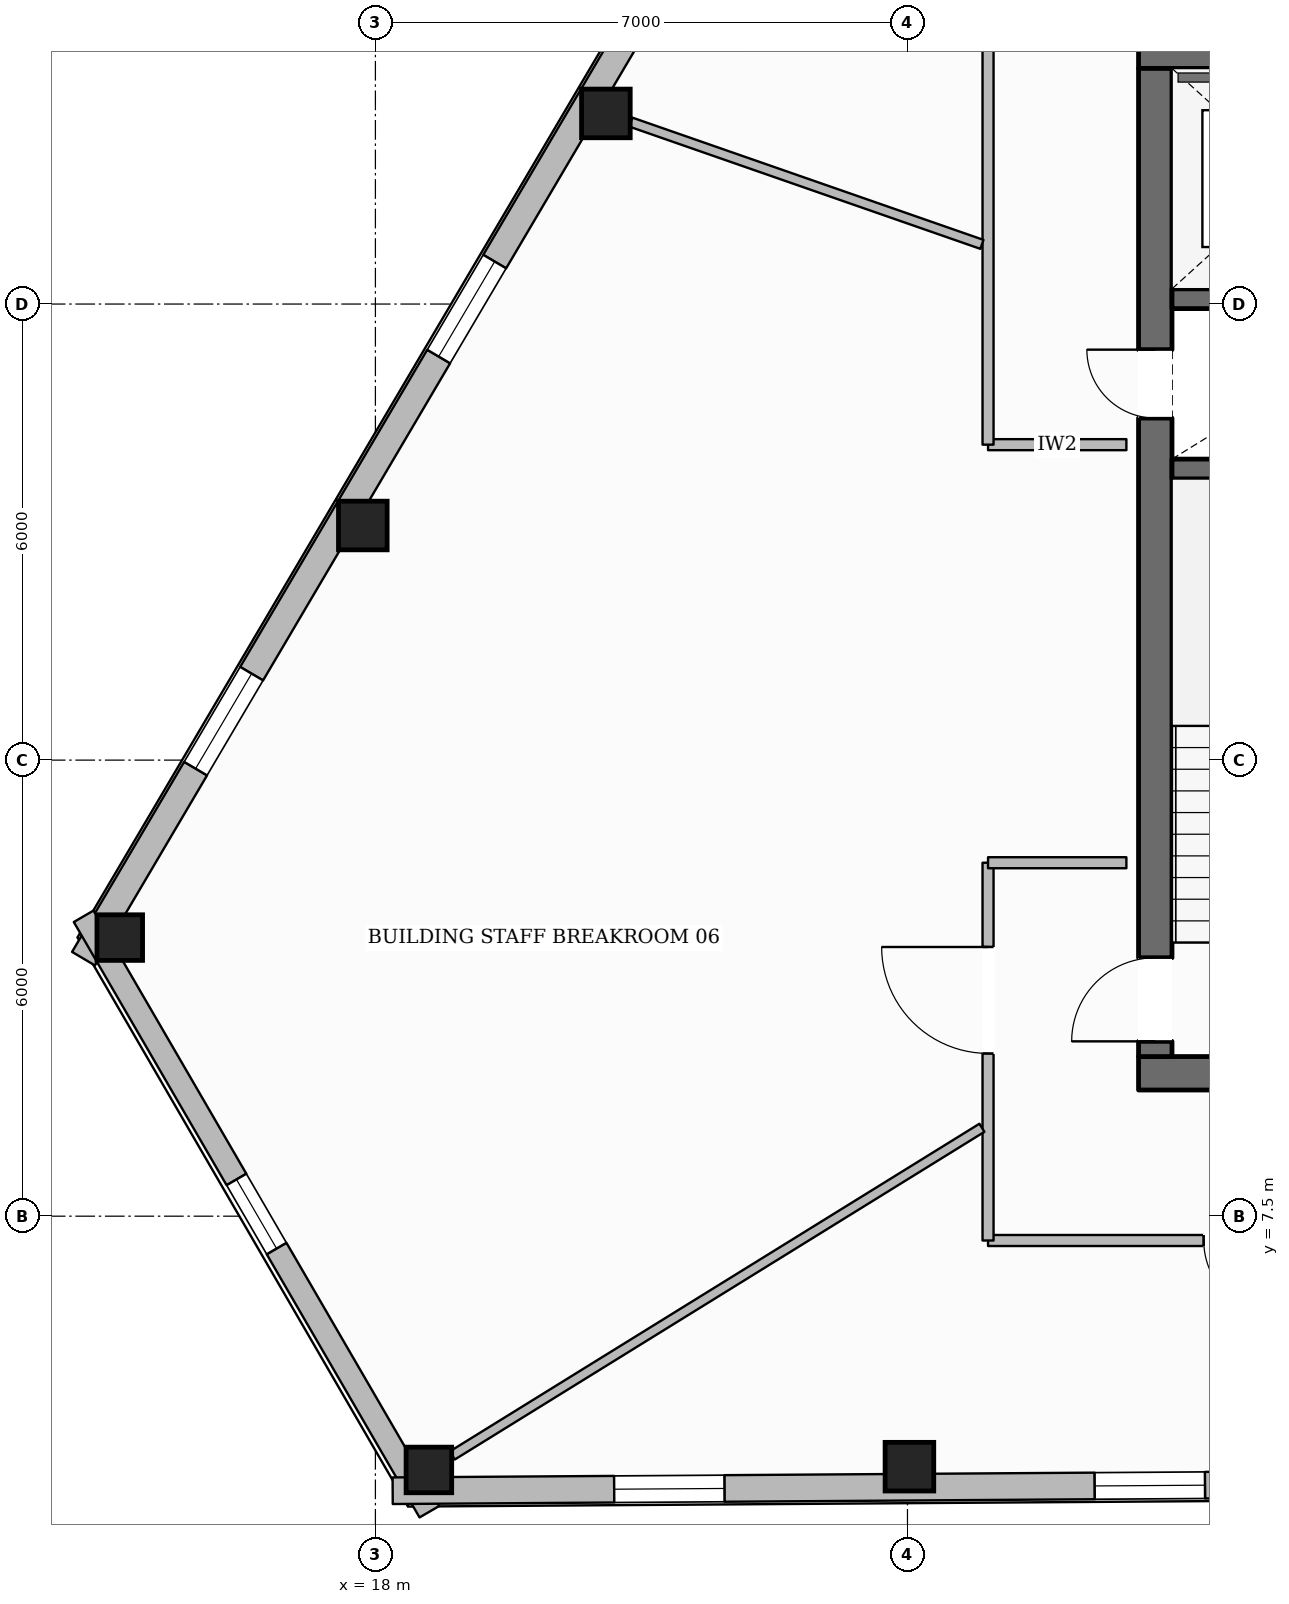
"""IFC4 building model, lengths in metres.
Left out: names, types, materials, properties, quantities, classifications, styles, units other than length and angle.
Written with IfcOpenShell. Run it as: python <this file> out.ifc"""

import sys

from ifc_helpers import new_model, si_unit, direction, frame, frame_2d, origin, origin_2d, place, context, subcontext, project, spatial, rectangle, hollow_rectangle, extrude, element, fill, save


model = new_model("IFC4")
c1 = context("Model", 3, precision=1e-05, world=origin(), true_north=direction((0.0, 1.0)))
c2 = subcontext(c1, "Body", "Model", "MODEL_VIEW")
j1 = project(units=[si_unit("LENGTHUNIT", "METRE"), si_unit("PLANEANGLEUNIT", "RADIAN")], contexts=[c1])
p1 = place(None, origin())
s1 = spatial("IfcSite", under=j1, at=p1, CompositionType="ELEMENT")
p2 = place(p1, origin())
s2 = spatial("IfcBuilding", under=s1, at=p2, CompositionType="ELEMENT")
p3 = place(p2, frame((0.0, 0.0, 211.2)))
s3 = spatial("IfcBuildingStorey", under=s2, at=p3, CompositionType="ELEMENT", Elevation=211.2)
p4 = place(p3, frame((28.04, 9.38, 0.0), z_axis=(0.0, 0.0, 1.0), x_axis=(1.0, 0.0, 0.0)))
e1 = element("IfcWall", 1, at=p4, inside=s3, PredefinedType="SOLIDWALL", context=c2, shape_type="SweptSolid", body=[
    extrude(rectangle(XDim=19.92, YDim=0.44, at=frame_2d((9.96, 0.0))), origin(), (0.0, 0.0, 1.0), 3.6),
])
p5 = place(p4, frame((10.46, 0.0, 0.0)))
e2 = element("IfcOpeningElement", 2, at=p5, cuts=e1, PredefinedType="OPENING", context=c2, shape_type="SweptSolid", body=[
    extrude(rectangle(XDim=1.4, YDim=2.2, at=frame_2d((0.7, 1.1))), frame((0.0, 0.23, 0.0), z_axis=(0.0, -1.0, 0.0), x_axis=(1.0, 0.0, 0.0)), (0.0, 0.0, 1.0), 0.46),
])
p6 = place(p3, frame((28.04, 22.82, 0.0), z_axis=(0.0, 0.0, 1.0), x_axis=(1.0, 0.0, 0.0)))
e3 = element("IfcWall", 3, at=p6, inside=s3, PredefinedType="SOLIDWALL", context=c2, shape_type="SweptSolid", body=[
    extrude(rectangle(XDim=19.92, YDim=0.44, at=frame_2d((9.96, 0.0))), origin(), (0.0, 0.0, 1.0), 3.6),
])
p7 = place(p6, frame((6.235, 0.0, 0.0)))
e4 = element("IfcOpeningElement", 4, at=p7, cuts=e3, PredefinedType="OPENING", context=c2, shape_type="SweptSolid", body=[
    extrude(rectangle(XDim=1.05, YDim=2.15, at=frame_2d((0.525, 1.075))), frame((0.0, 0.23, 0.0), z_axis=(0.0, -1.0, 0.0), x_axis=(1.0, 0.0, 0.0)), (0.0, 0.0, 1.0), 0.46),
])
p8 = place(p6, frame((12.635, 0.0, 0.0)))
e5 = element("IfcOpeningElement", 5, at=p8, cuts=e3, PredefinedType="OPENING", context=c2, shape_type="SweptSolid", body=[
    extrude(rectangle(XDim=1.05, YDim=2.15, at=frame_2d((0.525, 1.075))), frame((0.0, 0.23, 0.0), z_axis=(0.0, -1.0, 0.0), x_axis=(1.0, 0.0, 0.0)), (0.0, 0.0, 1.0), 0.46),
])
p9 = place(p3, frame((28.26, 9.6, 0.0), z_axis=(0.0, 0.0, 1.0), x_axis=(0.0, 1.0, 0.0)))
e6 = element("IfcWall", 6, at=p9, inside=s3, PredefinedType="SOLIDWALL", context=c2, shape_type="SweptSolid", body=[
    extrude(rectangle(XDim=13.0, YDim=0.44, at=frame_2d((6.5, 0.0))), origin(), (0.0, 0.0, 1.0), 3.6),
])
p10 = place(p9, frame((0.2, 0.0, 0.0)))
e7 = element("IfcOpeningElement", 7, at=p10, cuts=e6, PredefinedType="OPENING", context=c2, shape_type="SweptSolid", body=[
    extrude(rectangle(XDim=1.1, YDim=2.15, at=frame_2d((0.55, 1.075))), frame((0.0, 0.23, 0.0), z_axis=(0.0, -1.0, 0.0), x_axis=(1.0, 0.0, 0.0)), (0.0, 0.0, 1.0), 0.46),
])
p11 = place(p9, frame((8.4, 0.0, 0.0)))
e8 = element("IfcOpeningElement", 8, at=p11, cuts=e6, PredefinedType="OPENING", context=c2, shape_type="SweptSolid", body=[
    extrude(rectangle(XDim=0.9, YDim=2.1, at=frame_2d((0.45, 1.05))), frame((0.0, 0.23, 0.0), z_axis=(0.0, -1.0, 0.0), x_axis=(1.0, 0.0, 0.0)), (0.0, 0.0, 1.0), 0.46),
])
for number, where, z_axis, x_axis in (
    (9, (28.48, 17.33, 0.0), (0.0, 0.0, 1.0), (1.0, 0.0, 0.0)),
    (10, (28.48, 19.57, 0.0), (0.0, 0.0, 1.0), (1.0, 0.0, 0.0)),
):
    element("IfcWall", number, at=place(p3, frame(where, z_axis=z_axis, x_axis=x_axis)), inside=s3, PredefinedType="SHEAR", context=c2, shape_type="SweptSolid", body=[
        extrude(rectangle(XDim=3.2, YDim=0.26, at=frame_2d((1.6, 0.0))), origin(), (0.0, 0.0, 1.0), 3.6),
    ])
for number, where, z_axis, x_axis in (
    (11, (21.032, 22.008, 0.0), (0.0, 0.0, 1.0), (1.0, 0.0, 0.0)),
    (12, (17.834, 16.586, 0.0), (0.0, 0.0, 1.0), (1.0, 0.0, 0.0)),
):
    element("IfcColumn", number, at=place(p3, frame(where, z_axis=z_axis, x_axis=x_axis)), inside=s3, PredefinedType="COLUMN", context=c2, shape_type="SweptSolid", body=[
        extrude(hollow_rectangle(XDim=0.64, YDim=0.64, WallThickness=0.028, at=origin_2d()), origin(), (0.0, 0.0, 1.0), 3.6),
    ])
for number, where, z_axis, x_axis in (
    (13, (14.637, 11.165, 0.0), (0.0, 0.0, 1.0), (1.0, 0.0, 0.0)),
    (14, (18.704, 4.162, 0.0), (0.0, 0.0, 1.0), (1.0, 0.0, 0.0)),
):
    element("IfcColumn", number, at=place(p3, frame(where, z_axis=z_axis, x_axis=x_axis)), inside=s3, PredefinedType="COLUMN", context=c2, shape_type="SweptSolid", body=[
        extrude(hollow_rectangle(XDim=0.6, YDim=0.6, WallThickness=0.028, at=origin_2d()), origin(), (0.0, 0.0, 1.0), 3.6),
    ])
p12 = place(p3, frame((25.026, 4.205, 0.0), z_axis=(0.0, 0.0, 1.0), x_axis=(1.0, 0.0, 0.0)))
e15 = element("IfcColumn", 15, at=p12, inside=s3, PredefinedType="COLUMN", context=c2, shape_type="SweptSolid", body=[
    extrude(hollow_rectangle(XDim=0.64, YDim=0.64, WallThickness=0.028, at=origin_2d()), origin(), (0.0, 0.0, 1.0), 3.6),
])
p13 = place(p3, frame((14.16, 10.888, 0.0), z_axis=(0.0, 0.0, 1.0), x_axis=(0.508058913236, 0.861322321017, 0.0)))
e16 = element("IfcWall", 16, at=p13, inside=s3, PredefinedType="STANDARD", context=c2, shape_type="SweptSolid", body=[
    extrude(rectangle(XDim=38.718, YDim=0.35, at=frame_2d((19.359, 0.0))), origin(), (0.0, 0.0, 1.0), 3.132),
])
p14 = place(p13, frame((34.374, 0.0, 0.65)))
e17 = element("IfcOpeningElement", 17, at=p14, cuts=e16, PredefinedType="OPENING", context=c2, shape_type="SweptSolid", body=[
    extrude(rectangle(XDim=1.45, YDim=1.75, at=frame_2d((0.725, 0.875))), frame((0.0, 0.185, 0.0), z_axis=(0.0, -1.0, 0.0), x_axis=(1.0, 0.0, 0.0)), (0.0, 0.0, 1.0), 0.37),
])
p15 = place(p13, frame((28.08, 0.0, 0.65)))
e18 = element("IfcOpeningElement", 18, at=p15, cuts=e16, PredefinedType="OPENING", context=c2, shape_type="SweptSolid", body=[
    extrude(rectangle(XDim=1.45, YDim=1.75, at=frame_2d((0.725, 0.875))), frame((0.0, 0.185, 0.0), z_axis=(0.0, -1.0, 0.0), x_axis=(1.0, 0.0, 0.0)), (0.0, 0.0, 1.0), 0.37),
])
p16 = place(p13, frame((15.491, 0.0, 0.65)))
e19 = element("IfcOpeningElement", 19, at=p16, cuts=e16, PredefinedType="OPENING", context=c2, shape_type="SweptSolid", body=[
    extrude(rectangle(XDim=1.45, YDim=1.75, at=frame_2d((0.725, 0.875))), frame((0.0, 0.185, 0.0), z_axis=(0.0, -1.0, 0.0), x_axis=(1.0, 0.0, 0.0)), (0.0, 0.0, 1.0), 0.37),
])
p17 = place(p13, frame((9.197, 0.0, 0.65)))
e20 = element("IfcOpeningElement", 20, at=p17, cuts=e16, PredefinedType="OPENING", context=c2, shape_type="SweptSolid", body=[
    extrude(rectangle(XDim=1.45, YDim=1.75, at=frame_2d((0.725, 0.875))), frame((0.0, 0.185, 0.0), z_axis=(0.0, -1.0, 0.0), x_axis=(1.0, 0.0, 0.0)), (0.0, 0.0, 1.0), 0.37),
])
p18 = place(p13, frame((2.903, 0.0, 0.65)))
e21 = element("IfcOpeningElement", 21, at=p18, cuts=e16, PredefinedType="OPENING", context=c2, shape_type="SweptSolid", body=[
    extrude(rectangle(XDim=1.45, YDim=1.75, at=frame_2d((0.725, 0.875))), frame((0.0, 0.185, 0.0), z_axis=(0.0, -1.0, 0.0), x_axis=(1.0, 0.0, 0.0)), (0.0, 0.0, 1.0), 0.37),
])
p19 = place(p3, frame((18.71, 3.612, 0.0), z_axis=(0.0, 0.0, 1.0), x_axis=(-0.502175829977, 0.864765538043, 0.0)))
e22 = element("IfcWall", 22, at=p19, inside=s3, PredefinedType="STANDARD", context=c2, shape_type="SweptSolid", body=[
    extrude(rectangle(XDim=9.058, YDim=0.3, at=frame_2d((4.529, 0.0))), origin(), (0.0, 0.0, 1.0), 3.132),
])
p20 = place(p19, frame((4.004, 0.0, 0.65)))
e23 = element("IfcOpeningElement", 23, at=p20, cuts=e22, PredefinedType="OPENING", context=c2, shape_type="SweptSolid", body=[
    extrude(rectangle(XDim=1.05, YDim=1.7, at=frame_2d((0.525, 0.85))), frame((0.0, 0.16, 0.0), z_axis=(0.0, -1.0, 0.0), x_axis=(1.0, 0.0, 0.0)), (0.0, 0.0, 1.0), 0.32),
])
p21 = place(p3, frame((57.109, 4.153, 0.0), z_axis=(0.0, 0.0, 1.0), x_axis=(-0.999976880016, -0.006799958314, 0.0)))
e24 = element("IfcWall", 24, at=p21, inside=s3, PredefinedType="STANDARD", context=c2, shape_type="SweptSolid", body=[
    extrude(rectangle(XDim=38.883, YDim=0.35, at=frame_2d((19.442, 0.0))), origin(), (0.0, 0.0, 1.0), 3.132),
])
p22 = place(p21, frame((34.519, 0.0, 0.65)))
e25 = element("IfcOpeningElement", 25, at=p22, cuts=e24, PredefinedType="OPENING", context=c2, shape_type="SweptSolid", body=[
    extrude(rectangle(XDim=1.45, YDim=1.75, at=frame_2d((0.725, 0.875))), frame((0.0, 0.185, 0.0), z_axis=(0.0, -1.0, 0.0), x_axis=(1.0, 0.0, 0.0)), (0.0, 0.0, 1.0), 0.37),
])
p23 = place(p21, frame((28.197, 0.0, 0.65)))
e26 = element("IfcOpeningElement", 26, at=p23, cuts=e24, PredefinedType="OPENING", context=c2, shape_type="SweptSolid", body=[
    extrude(rectangle(XDim=1.45, YDim=1.75, at=frame_2d((0.725, 0.875))), frame((0.0, 0.185, 0.0), z_axis=(0.0, -1.0, 0.0), x_axis=(1.0, 0.0, 0.0)), (0.0, 0.0, 1.0), 0.37),
])
p24 = place(p21, frame((15.552, 0.0, 0.65)))
e27 = element("IfcOpeningElement", 27, at=p24, cuts=e24, PredefinedType="OPENING", context=c2, shape_type="SweptSolid", body=[
    extrude(rectangle(XDim=1.45, YDim=1.75, at=frame_2d((0.725, 0.875))), frame((0.0, 0.185, 0.0), z_axis=(0.0, -1.0, 0.0), x_axis=(1.0, 0.0, 0.0)), (0.0, 0.0, 1.0), 0.37),
])
p25 = place(p21, frame((9.23, 0.0, 0.65)))
e28 = element("IfcOpeningElement", 28, at=p25, cuts=e24, PredefinedType="OPENING", context=c2, shape_type="SweptSolid", body=[
    extrude(rectangle(XDim=1.45, YDim=1.75, at=frame_2d((0.725, 0.875))), frame((0.0, 0.185, 0.0), z_axis=(0.0, -1.0, 0.0), x_axis=(1.0, 0.0, 0.0)), (0.0, 0.0, 1.0), 0.37),
])
p26 = place(p21, frame((2.908, 0.0, 0.65)))
e29 = element("IfcOpeningElement", 29, at=p26, cuts=e24, PredefinedType="OPENING", context=c2, shape_type="SweptSolid", body=[
    extrude(rectangle(XDim=1.45, YDim=1.75, at=frame_2d((0.725, 0.875))), frame((0.0, 0.185, 0.0), z_axis=(0.0, -1.0, 0.0), x_axis=(1.0, 0.0, 0.0)), (0.0, 0.0, 1.0), 0.37),
])
p27 = place(p3, frame((27.88, 17.65, 0.0), z_axis=(0.0, 0.0, 1.0), x_axis=(-1.0, 0.0, 0.0)))
e30 = element("IfcWall", 30, at=p27, inside=s3, PredefinedType="PARTITIONING", context=c2, shape_type="SweptSolid", body=[
    extrude(rectangle(XDim=1.82, YDim=0.145, at=frame_2d((0.91, 0.0))), origin(), (0.0, 0.0, 1.0), 3.6),
])
p28 = place(p3, frame((26.06, 17.65, 0.0), z_axis=(0.0, 0.0, 1.0), x_axis=(0.0, 1.0, 0.0)))
e31 = element("IfcWall", 31, at=p28, inside=s3, PredefinedType="PARTITIONING", context=c2, shape_type="SweptSolid", body=[
    extrude(rectangle(XDim=7.37, YDim=0.145, at=frame_2d((3.685, 0.0))), origin(), (0.0, 0.0, 1.0), 3.339),
])
p29 = place(p3, frame((49.94, 7.18, 0.0), z_axis=(0.0, 0.0, 1.0), x_axis=(-1.0, 0.0, 0.0)))
e32 = element("IfcWall", 32, at=p29, inside=s3, PredefinedType="PARTITIONING", context=c2, shape_type="SweptSolid", body=[
    extrude(rectangle(XDim=23.88, YDim=0.145, at=frame_2d((11.94, 0.0))), origin(), (0.0, 0.0, 1.0), 3.6),
])
p30 = place(p29, frame((20.062, 0.0, 0.0)))
e33 = element("IfcOpeningElement", 33, at=p30, cuts=e32, PredefinedType="OPENING", context=c2, shape_type="SweptSolid", body=[
    extrude(rectangle(XDim=0.98, YDim=2.15, at=frame_2d((0.49, 1.075))), frame((0.0, 0.083, 0.0), z_axis=(0.0, -1.0, 0.0), x_axis=(1.0, 0.0, 0.0)), (0.0, 0.0, 1.0), 0.165),
])
p31 = place(p29, frame((10.027, 0.0, 0.0)))
e34 = element("IfcOpeningElement", 34, at=p31, cuts=e32, PredefinedType="OPENING", context=c2, shape_type="SweptSolid", body=[
    extrude(rectangle(XDim=1.02, YDim=2.15, at=frame_2d((0.51, 1.075))), frame((0.0, 0.083, 0.0), z_axis=(0.0, -1.0, 0.0), x_axis=(1.0, 0.0, 0.0)), (0.0, 0.0, 1.0), 0.165),
])
p32 = place(p3, frame((26.06, 7.18, 0.0), z_axis=(0.0, 0.0, 1.0), x_axis=(0.0, 1.0, 0.0)))
e35 = element("IfcWall", 35, at=p32, inside=s3, PredefinedType="PARTITIONING", context=c2, shape_type="SweptSolid", body=[
    extrude(rectangle(XDim=4.97, YDim=0.145, at=frame_2d((2.485, 0.0))), origin(), (0.0, 0.0, 1.0), 3.6),
])
p33 = place(p32, frame((2.461, 0.0, 0.0)))
e36 = element("IfcOpeningElement", 36, at=p33, cuts=e35, PredefinedType="OPENING", context=c2, shape_type="SweptSolid", body=[
    extrude(rectangle(XDim=1.4, YDim=2.2, at=frame_2d((0.7, 1.1))), frame((0.0, 0.083, 0.0), z_axis=(0.0, -1.0, 0.0), x_axis=(1.0, 0.0, 0.0)), (0.0, 0.0, 1.0), 0.165),
])
p34 = place(p3, frame((26.06, 12.15, 0.0), z_axis=(0.0, 0.0, 1.0), x_axis=(1.0, 0.0, 0.0)))
e37 = element("IfcWall", 37, at=p34, inside=s3, PredefinedType="PARTITIONING", context=c2, shape_type="SweptSolid", body=[
    extrude(rectangle(XDim=1.82, YDim=0.145, at=frame_2d((0.91, 0.0))), origin(), (0.0, 0.0, 1.0), 3.6),
])
p35 = place(p3, frame((25.979, 20.285, 0.0), z_axis=(0.0, 0.0, 1.0), x_axis=(-0.944391705218, 0.328822607366, 0.0)))
e38 = element("IfcWall", 38, at=p35, inside=s3, PredefinedType="PARTITIONING", context=c2, shape_type="SweptSolid", body=[
    extrude(rectangle(XDim=4.891, YDim=0.125, at=frame_2d((2.446, 0.0))), origin(), (0.0, 0.0, 1.0), 3.6),
])
p36 = place(p3, frame((25.979, 8.663, 0.0), z_axis=(0.0, 0.0, 1.0), x_axis=(-0.850393393123, -0.526147390882, 0.0)))
e39 = element("IfcWall", 39, at=p36, inside=s3, PredefinedType="PARTITIONING", context=c2, shape_type="SweptSolid", body=[
    extrude(rectangle(XDim=8.194, YDim=0.125, at=frame_2d((4.097, 0.0))), origin(), (0.0, 0.0, 1.0), 3.141),
])
p37 = place(p17, origin())
e40 = element("IfcWindow", 40, at=p37, inside=s3, PartitioningType="SINGLE_PANEL", PredefinedType="WINDOW", context=c2, shape_type="SweptSolid", body=[
    extrude(rectangle(XDim=1.45, YDim=1.75, at=frame_2d((0.725, 0.875))), frame((0.0, 0.03, 0.0), z_axis=(0.0, -1.0, 0.0), x_axis=(1.0, 0.0, 0.0)), (0.0, 0.0, 1.0), 0.06),
])
fill(e20, e40)
p38 = place(p18, origin())
e41 = element("IfcWindow", 41, at=p38, inside=s3, PartitioningType="SINGLE_PANEL", PredefinedType="WINDOW", context=c2, shape_type="SweptSolid", body=[
    extrude(rectangle(XDim=1.45, YDim=1.75, at=frame_2d((0.725, 0.875))), frame((0.0, 0.03, 0.0), z_axis=(0.0, -1.0, 0.0), x_axis=(1.0, 0.0, 0.0)), (0.0, 0.0, 1.0), 0.06),
])
fill(e21, e41)
p39 = place(p22, origin())
e42 = element("IfcWindow", 42, at=p39, inside=s3, PartitioningType="SINGLE_PANEL", PredefinedType="WINDOW", context=c2, shape_type="SweptSolid", body=[
    extrude(rectangle(XDim=1.45, YDim=1.75, at=frame_2d((0.725, 0.875))), frame((0.0, 0.03, 0.0), z_axis=(0.0, -1.0, 0.0), x_axis=(1.0, 0.0, 0.0)), (0.0, 0.0, 1.0), 0.06),
])
fill(e25, e42)
p40 = place(p23, origin())
e43 = element("IfcWindow", 43, at=p40, inside=s3, PartitioningType="SINGLE_PANEL", PredefinedType="WINDOW", context=c2, shape_type="SweptSolid", body=[
    extrude(rectangle(XDim=1.45, YDim=1.75, at=frame_2d((0.725, 0.875))), frame((0.0, 0.03, 0.0), z_axis=(0.0, -1.0, 0.0), x_axis=(1.0, 0.0, 0.0)), (0.0, 0.0, 1.0), 0.06),
])
fill(e26, e43)
p41 = place(p20, origin())
e44 = element("IfcWindow", 44, at=p41, inside=s3, PartitioningType="SINGLE_PANEL", PredefinedType="WINDOW", context=c2, shape_type="SweptSolid", body=[
    extrude(rectangle(XDim=1.05, YDim=1.7, at=frame_2d((0.525, 0.85))), frame((0.0, 0.03, 0.0), z_axis=(0.0, -1.0, 0.0), x_axis=(1.0, 0.0, 0.0)), (0.0, 0.0, 1.0), 0.06),
])
fill(e23, e44)
p42 = place(p10, origin())
e45 = element("IfcDoor", 45, at=p42, inside=s3, OperationType="SINGLE_SWING_LEFT", PredefinedType="DOOR", context=c2, shape_type="SweptSolid", body=[
    extrude(rectangle(XDim=1.1, YDim=2.15, at=frame_2d((0.55, 1.075))), frame((0.0, 0.025, 0.0), z_axis=(0.0, -1.0, 0.0), x_axis=(1.0, 0.0, 0.0)), (0.0, 0.0, 1.0), 0.05),
])
fill(e7, e45)
p43 = place(p11, origin())
e46 = element("IfcDoor", 46, at=p43, inside=s3, OperationType="SINGLE_SWING_RIGHT", PredefinedType="DOOR", context=c2, shape_type="SweptSolid", body=[
    extrude(rectangle(XDim=0.9, YDim=2.1, at=frame_2d((0.45, 1.05))), frame((0.0, 0.025, 0.0), z_axis=(0.0, -1.0, 0.0), x_axis=(1.0, 0.0, 0.0)), (0.0, 0.0, 1.0), 0.05),
])
fill(e8, e46)
p44 = place(p33, origin())
e47 = element("IfcDoor", 47, at=p44, inside=s3, OperationType="SINGLE_SWING_RIGHT", PredefinedType="DOOR", context=c2, shape_type="SweptSolid", body=[
    extrude(rectangle(XDim=1.4, YDim=2.2, at=frame_2d((0.7, 1.1))), frame((0.0, 0.025, 0.0), z_axis=(0.0, -1.0, 0.0), x_axis=(1.0, 0.0, 0.0)), (0.0, 0.0, 1.0), 0.05),
])
fill(e36, e47)
p45 = place(p30, origin())
e48 = element("IfcDoor", 48, at=p45, inside=s3, OperationType="SINGLE_SWING_LEFT", PredefinedType="DOOR", context=c2, shape_type="SweptSolid", body=[
    extrude(rectangle(XDim=0.98, YDim=2.15, at=frame_2d((0.49, 1.075))), frame((0.0, 0.025, 0.0), z_axis=(0.0, -1.0, 0.0), x_axis=(1.0, 0.0, 0.0)), (0.0, 0.0, 1.0), 0.05),
])
fill(e33, e48)
save(model, sys.argv[1])
